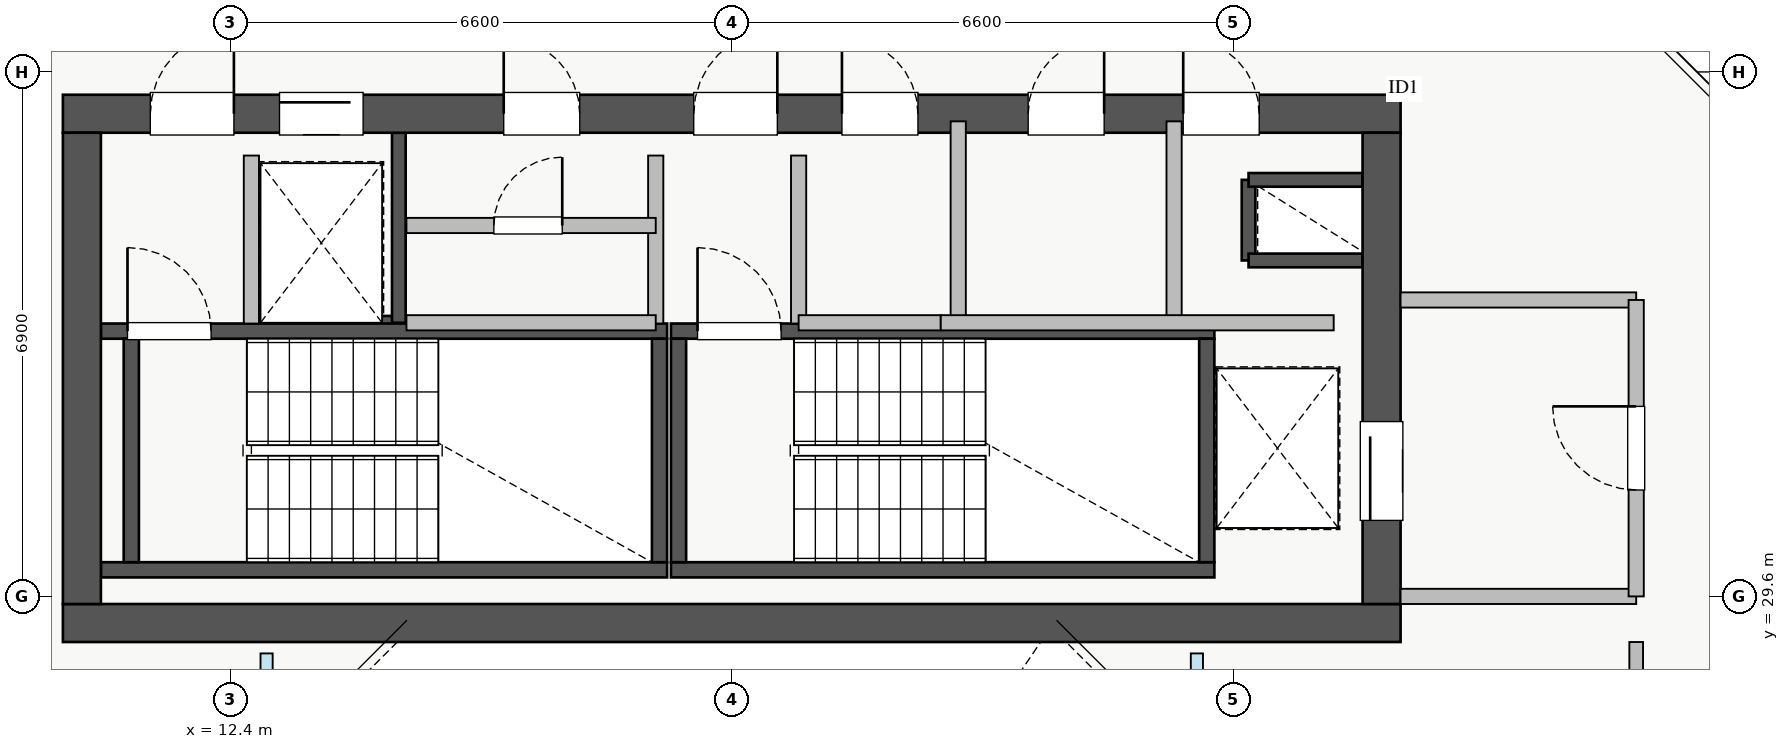
"""IFC4 building model, lengths in metres.
Left out: names, types, materials, properties, quantities, classifications, styles, units other than length and angle.
Written with IfcOpenShell. Run it as: python <this file> out.ifc"""

import sys

from ifc_helpers import new_model, si_unit, direction, frame, frame_2d, origin, place, context, subcontext, project, spatial, rectangle, extrude, source, transform, mapped, element, fill, save


model = new_model("IFC4")
c1 = context("Model", 3, precision=1e-05, world=origin(), true_north=direction((0.0, 1.0)))
c2 = subcontext(c1, "Body", "Model", "MODEL_VIEW")
j1 = project(units=[si_unit("LENGTHUNIT", "METRE"), si_unit("PLANEANGLEUNIT", "RADIAN")], contexts=[c1])
p1 = place(None, origin())
s1 = spatial("IfcSite", under=j1, at=p1, CompositionType="ELEMENT")
p2 = place(p1, origin())
s2 = spatial("IfcBuilding", under=s1, at=p2, CompositionType="ELEMENT")
p3 = place(p2, frame((0.0, 0.0, 219.75)))
s3 = spatial("IfcBuildingStorey", under=s2, at=p3, CompositionType="ELEMENT", Elevation=219.75)
p4 = place(p3, frame((12.68, 33.2, 0.0), z_axis=(0.0, 0.0, 1.0), x_axis=(1.0, 0.0, 0.0)))
e1 = element("IfcWall", 1, at=p4, inside=s3, PredefinedType="SHEAR", context=c2, shape_type="SweptSolid", body=[
    extrude(rectangle(XDim=1.94, YDim=0.18, at=frame_2d((0.97, 0.0))), origin(), (0.0, 0.0, 1.0), 3.07),
])
p5 = place(p3, frame((14.62, 33.2, 0.0), z_axis=(0.0, 0.0, 1.0), x_axis=(0.0, 1.0, 0.0)))
e2 = element("IfcWall", 2, at=p5, inside=s3, PredefinedType="SHEAR", context=c2, shape_type="SweptSolid", body=[
    extrude(rectangle(XDim=2.5, YDim=0.18, at=frame_2d((1.25, 0.0))), origin(), (0.0, 0.0, 1.0), 3.07),
])
p6 = place(p3, frame((25.8, 34.02, 0.0), z_axis=(0.0, 0.0, 1.0), x_axis=(0.0, 1.0, 0.0)))
e3 = element("IfcWall", 3, at=p6, inside=s3, PredefinedType="SHEAR", context=c2, shape_type="SweptSolid", body=[
    extrude(rectangle(XDim=1.06, YDim=0.18, at=frame_2d((0.53, 0.0))), origin(), (0.0, 0.0, 1.0), 3.07),
])
for number, where, z_axis, x_axis in (
    (4, (25.8, 35.08, 0.0), (0.0, 0.0, 1.0), (1.0, 0.0, 0.0)),
    (5, (25.8, 34.02, 0.0), (0.0, 0.0, 1.0), (1.0, 0.0, 0.0)),
):
    element("IfcWall", number, at=place(p3, frame(where, z_axis=z_axis, x_axis=x_axis)), inside=s3, PredefinedType="SHEAR", context=c2, shape_type="SweptSolid", body=[
        extrude(rectangle(XDim=1.5, YDim=0.18, at=frame_2d((0.75, 0.0))), origin(), (0.0, 0.0, 1.0), 3.07),
    ])
p7 = place(p3, frame((10.7, 29.95, 0.0), z_axis=(0.0, 0.0, 1.0), x_axis=(1.0, 0.0, 0.0)))
e6 = element("IfcWall", 6, at=p7, inside=s3, PredefinedType="SHEAR", context=c2, shape_type="SweptSolid", body=[
    extrude(rectangle(XDim=7.45, YDim=0.2, at=frame_2d((3.725, 0.0))), origin(), (0.0, 0.0, 1.0), 3.25),
])
p8 = place(p3, frame((10.7, 33.09, 0.0), z_axis=(0.0, 0.0, 1.0), x_axis=(1.0, 0.0, 0.0)))
e7 = element("IfcWall", 7, at=p8, inside=s3, PredefinedType="SHEAR", context=c2, shape_type="SweptSolid", body=[
    extrude(rectangle(XDim=7.45, YDim=0.2, at=frame_2d((3.725, 0.0))), origin(), (0.0, 0.0, 1.0), 3.25),
])
p9 = place(p8, frame((0.35, 0.0, 0.0)))
e8 = element("IfcOpeningElement", 8, at=p9, cuts=e7, PredefinedType="OPENING", context=c2, shape_type="SweptSolid", body=[
    extrude(rectangle(XDim=1.1, YDim=2.05, at=frame_2d((0.55, 1.025))), frame((0.0, 0.11, 0.0), z_axis=(0.0, -1.0, 0.0), x_axis=(1.0, 0.0, 0.0)), (0.0, 0.0, 1.0), 0.22),
])
for number, where, z_axis, x_axis in (
    (9, (11.1, 30.05, 0.0), (0.0, 0.0, 1.0), (0.0, 1.0, 0.0)),
    (10, (18.05, 30.05, 0.0), (0.0, 0.0, 1.0), (0.0, 1.0, 0.0)),
):
    element("IfcWall", number, at=place(p3, frame(where, z_axis=z_axis, x_axis=x_axis)), inside=s3, PredefinedType="SHEAR", context=c2, shape_type="SweptSolid", body=[
        extrude(rectangle(XDim=2.94, YDim=0.2, at=frame_2d((1.47, 0.0))), origin(), (0.0, 0.0, 1.0), 3.25),
    ])
p10 = place(p3, frame((18.2, 29.95, 0.0), z_axis=(0.0, 0.0, 1.0), x_axis=(1.0, 0.0, 0.0)))
e11 = element("IfcWall", 11, at=p10, inside=s3, PredefinedType="SHEAR", context=c2, shape_type="SweptSolid", body=[
    extrude(rectangle(XDim=7.15, YDim=0.2, at=frame_2d((3.575, 0.0))), origin(), (0.0, 0.0, 1.0), 3.25),
])
p11 = place(p3, frame((18.2, 33.09, 0.0), z_axis=(0.0, 0.0, 1.0), x_axis=(1.0, 0.0, 0.0)))
e12 = element("IfcWall", 12, at=p11, inside=s3, PredefinedType="SHEAR", context=c2, shape_type="SweptSolid", body=[
    extrude(rectangle(XDim=7.15, YDim=0.2, at=frame_2d((3.575, 0.0))), origin(), (0.0, 0.0, 1.0), 3.25),
])
p12 = place(p11, frame((0.35, 0.0, 0.0)))
e13 = element("IfcOpeningElement", 13, at=p12, cuts=e12, PredefinedType="OPENING", context=c2, shape_type="SweptSolid", body=[
    extrude(rectangle(XDim=1.1, YDim=2.05, at=frame_2d((0.55, 1.025))), frame((0.0, 0.11, 0.0), z_axis=(0.0, -1.0, 0.0), x_axis=(1.0, 0.0, 0.0)), (0.0, 0.0, 1.0), 0.22),
])
for number, where, z_axis, x_axis in (
    (14, (18.3, 30.05, 0.0), (0.0, 0.0, 1.0), (0.0, 1.0, 0.0)),
    (15, (25.25, 30.05, 0.0), (0.0, 0.0, 1.0), (0.0, 1.0, 0.0)),
):
    element("IfcWall", number, at=place(p3, frame(where, z_axis=z_axis, x_axis=x_axis)), inside=s3, PredefinedType="SHEAR", context=c2, shape_type="SweptSolid", body=[
        extrude(rectangle(XDim=2.94, YDim=0.2, at=frame_2d((1.47, 0.0))), origin(), (0.0, 0.0, 1.0), 3.25),
    ])
p13 = place(p3, frame((10.2, 29.25, 0.0), z_axis=(0.0, 0.0, 1.0), x_axis=(1.0, 0.0, 0.0)))
e16 = element("IfcWall", 16, at=p13, inside=s3, PredefinedType="SHEAR", context=c2, shape_type="SweptSolid", body=[
    extrude(rectangle(XDim=17.6, YDim=0.5, at=frame_2d((8.8, 0.0))), origin(), (0.0, 0.0, 1.0), 3.25),
])
p14 = place(p3, frame((10.2, 35.95, 0.0), z_axis=(0.0, 0.0, 1.0), x_axis=(1.0, 0.0, 0.0)))
e17 = element("IfcWall", 17, at=p14, inside=s3, PredefinedType="SHEAR", context=c2, shape_type="SweptSolid", body=[
    extrude(rectangle(XDim=17.6, YDim=0.5, at=frame_2d((8.8, 0.0))), origin(), (0.0, 0.0, 1.0), 3.25),
])
p15 = place(p14, frame((1.15, 0.0, 0.0)))
e18 = element("IfcOpeningElement", 18, at=p15, cuts=e17, PredefinedType="OPENING", context=c2, shape_type="SweptSolid", body=[
    extrude(rectangle(XDim=1.1, YDim=2.05, at=frame_2d((0.55, 1.025))), frame((0.0, 0.26, 0.0), z_axis=(0.0, -1.0, 0.0), x_axis=(1.0, 0.0, 0.0)), (0.0, 0.0, 1.0), 0.52),
])
p16 = place(p14, frame((8.3, 0.0, 0.0)))
e19 = element("IfcOpeningElement", 19, at=p16, cuts=e17, PredefinedType="OPENING", context=c2, shape_type="SweptSolid", body=[
    extrude(rectangle(XDim=1.1, YDim=2.05, at=frame_2d((0.55, 1.025))), frame((0.0, 0.26, 0.0), z_axis=(0.0, -1.0, 0.0), x_axis=(1.0, 0.0, 0.0)), (0.0, 0.0, 1.0), 0.52),
])
p17 = place(p14, frame((2.85, 0.0, 0.0)))
e20 = element("IfcOpeningElement", 20, at=p17, cuts=e17, PredefinedType="OPENING", context=c2, shape_type="SweptSolid", body=[
    extrude(rectangle(XDim=1.1, YDim=2.05, at=frame_2d((0.55, 1.025))), frame((0.0, 0.26, 0.0), z_axis=(0.0, -1.0, 0.0), x_axis=(1.0, 0.0, 0.0)), (0.0, 0.0, 1.0), 0.52),
])
p18 = place(p14, frame((5.8, 0.0, 0.0)))
e21 = element("IfcOpeningElement", 21, at=p18, cuts=e17, PredefinedType="OPENING", context=c2, shape_type="SweptSolid", body=[
    extrude(rectangle(XDim=1.0, YDim=2.05, at=frame_2d((0.5, 1.025))), frame((0.0, 0.26, 0.0), z_axis=(0.0, -1.0, 0.0), x_axis=(1.0, 0.0, 0.0)), (0.0, 0.0, 1.0), 0.52),
])
p19 = place(p14, frame((14.74, 0.0, 0.0)))
e22 = element("IfcOpeningElement", 22, at=p19, cuts=e17, PredefinedType="OPENING", context=c2, shape_type="SweptSolid", body=[
    extrude(rectangle(XDim=1.0, YDim=2.05, at=frame_2d((0.5, 1.025))), frame((0.0, 0.26, 0.0), z_axis=(0.0, -1.0, 0.0), x_axis=(1.0, 0.0, 0.0)), (0.0, 0.0, 1.0), 0.52),
])
p20 = place(p14, frame((10.25, 0.0, 0.0)))
e23 = element("IfcOpeningElement", 23, at=p20, cuts=e17, PredefinedType="OPENING", context=c2, shape_type="SweptSolid", body=[
    extrude(rectangle(XDim=1.0, YDim=2.05, at=frame_2d((0.5, 1.025))), frame((0.0, 0.26, 0.0), z_axis=(0.0, -1.0, 0.0), x_axis=(1.0, 0.0, 0.0)), (0.0, 0.0, 1.0), 0.52),
])
p21 = place(p14, frame((12.7, 0.0, 0.0)))
e24 = element("IfcOpeningElement", 24, at=p21, cuts=e17, PredefinedType="OPENING", context=c2, shape_type="SweptSolid", body=[
    extrude(rectangle(XDim=1.0, YDim=2.05, at=frame_2d((0.5, 1.025))), frame((0.0, 0.26, 0.0), z_axis=(0.0, -1.0, 0.0), x_axis=(1.0, 0.0, 0.0)), (0.0, 0.0, 1.0), 0.52),
])
p22 = place(p3, frame((10.45, 29.5, 0.0), z_axis=(0.0, 0.0, 1.0), x_axis=(0.0, 1.0, 0.0)))
e25 = element("IfcWall", 25, at=p22, inside=s3, PredefinedType="SHEAR", context=c2, shape_type="SweptSolid", body=[
    extrude(rectangle(XDim=6.2, YDim=0.5, at=frame_2d((3.1, 0.0))), origin(), (0.0, 0.0, 1.0), 3.25),
])
p23 = place(p3, frame((27.55, 29.5, 0.0), z_axis=(0.0, 0.0, 1.0), x_axis=(0.0, 1.0, 0.0)))
e26 = element("IfcWall", 26, at=p23, inside=s3, PredefinedType="SHEAR", context=c2, shape_type="SweptSolid", body=[
    extrude(rectangle(XDim=6.2, YDim=0.5, at=frame_2d((3.1, 0.0))), origin(), (0.0, 0.0, 1.0), 3.25),
])
p24 = place(p23, frame((1.1, 0.0, 0.0)))
e27 = element("IfcOpeningElement", 27, at=p24, cuts=e26, PredefinedType="OPENING", context=c2, shape_type="SweptSolid", body=[
    extrude(rectangle(XDim=1.3, YDim=2.05, at=frame_2d((0.65, 1.025))), frame((0.0, 0.26, 0.0), z_axis=(0.0, -1.0, 0.0), x_axis=(1.0, 0.0, 0.0)), (0.0, 0.0, 1.0), 0.52),
])
p25 = place(p3, frame((27.8, 29.6, 0.0), z_axis=(0.0, 0.0, 1.0), x_axis=(1.0, 0.0, 0.0)))
e28 = element("IfcWall", 28, at=p25, inside=s3, PredefinedType="PARTITIONING", context=c2, shape_type="SweptSolid", body=[
    extrude(rectangle(XDim=3.1, YDim=0.2, at=frame_2d((1.55, 0.0))), origin(), (0.0, 0.0, 1.0), 3.07),
])
p26 = place(p3, frame((27.8, 33.5, 0.0), z_axis=(0.0, 0.0, 1.0), x_axis=(1.0, 0.0, 0.0)))
e29 = element("IfcWall", 29, at=p26, inside=s3, PredefinedType="PARTITIONING", context=c2, shape_type="SweptSolid", body=[
    extrude(rectangle(XDim=3.1, YDim=0.2, at=frame_2d((1.55, 0.0))), origin(), (0.0, 0.0, 1.0), 2.265),
])
p27 = place(p3, frame((30.9, 29.6, 0.0), z_axis=(0.0, 0.0, 1.0), x_axis=(0.0, 1.0, 0.0)))
e30 = element("IfcWall", 30, at=p27, inside=s3, PredefinedType="PARTITIONING", context=c2, shape_type="SweptSolid", body=[
    extrude(rectangle(XDim=3.9, YDim=0.2, at=frame_2d((1.95, 0.0))), origin(), (0.0, 0.0, 1.0), 3.07),
])
p28 = place(p27, frame((1.4, 0.0, 0.0)))
e31 = element("IfcOpeningElement", 31, at=p28, cuts=e30, PredefinedType="OPENING", context=c2, shape_type="SweptSolid", body=[
    extrude(rectangle(XDim=1.1, YDim=2.05, at=frame_2d((0.55, 1.025))), frame((0.0, 0.11, 0.0), z_axis=(0.0, -1.0, 0.0), x_axis=(1.0, 0.0, 0.0)), (0.0, 0.0, 1.0), 0.22),
])
for number, where, z_axis, x_axis in (
    (32, (12.68, 33.19, 0.0), (0.0, 0.0, 1.0), (0.0, 1.0, 0.0)),
    (33, (18.0, 33.19, 0.0), (0.0, 0.0, 1.0), (0.0, 1.0, 0.0)),
    (34, (19.88, 33.19, 0.0), (0.0, 0.0, 1.0), (0.0, 1.0, 0.0)),
):
    element("IfcWall", number, at=place(p3, frame(where, z_axis=z_axis, x_axis=x_axis)), inside=s3, PredefinedType="PARTITIONING", context=c2, shape_type="SweptSolid", body=[
        extrude(rectangle(XDim=2.21, YDim=0.2, at=frame_2d((1.105, 0.0))), origin(), (0.0, 0.0, 1.0), 3.07),
    ])
p29 = place(p3, frame((14.72, 34.48, 0.0), z_axis=(0.0, 0.0, 1.0), x_axis=(1.0, 0.0, 0.0)))
e35 = element("IfcWall", 35, at=p29, inside=s3, PredefinedType="PARTITIONING", context=c2, shape_type="SweptSolid", body=[
    extrude(rectangle(XDim=3.28, YDim=0.2, at=frame_2d((1.64, 0.0))), origin(), (0.0, 0.0, 1.0), 3.07),
])
p30 = place(p29, frame((1.15, 0.0, 0.0)))
e36 = element("IfcOpeningElement", 36, at=p30, cuts=e35, PredefinedType="OPENING", context=c2, shape_type="SweptSolid", body=[
    extrude(rectangle(XDim=0.9, YDim=2.05, at=frame_2d((0.45, 1.025))), frame((0.0, 0.11, 0.0), z_axis=(0.0, -1.0, 0.0), x_axis=(1.0, 0.0, 0.0)), (0.0, 0.0, 1.0), 0.22),
])
p31 = place(p3, frame((14.72, 33.2, 0.0), z_axis=(0.0, 0.0, 1.0), x_axis=(1.0, 0.0, 0.0)))
e37 = element("IfcWall", 37, at=p31, inside=s3, PredefinedType="PARTITIONING", context=c2, shape_type="SweptSolid", body=[
    extrude(rectangle(XDim=3.28, YDim=0.2, at=frame_2d((1.64, 0.0))), origin(), (0.0, 0.0, 1.0), 3.07),
])
p32 = place(p3, frame((24.82, 33.2, 0.0), z_axis=(0.0, 0.0, 1.0), x_axis=(0.0, 1.0, 0.0)))
e38 = element("IfcWall", 38, at=p32, inside=s3, PredefinedType="PARTITIONING", context=c2, shape_type="SweptSolid", body=[
    extrude(rectangle(XDim=2.65, YDim=0.2, at=frame_2d((1.325, 0.0))), origin(), (0.0, 0.0, 1.0), 3.07),
])
p33 = place(p3, frame((19.88, 33.2, 0.0), z_axis=(0.0, 0.0, 1.0), x_axis=(1.0, 0.0, 0.0)))
e39 = element("IfcWall", 39, at=p33, inside=s3, PredefinedType="PARTITIONING", context=c2, shape_type="SweptSolid", body=[
    extrude(rectangle(XDim=1.87, YDim=0.2, at=frame_2d((0.935, 0.0))), origin(), (0.0, 0.0, 1.0), 3.07),
])
p34 = place(p3, frame((21.98, 33.2, 0.0), z_axis=(0.0, 0.0, 1.0), x_axis=(0.0, 1.0, 0.0)))
e40 = element("IfcWall", 40, at=p34, inside=s3, PredefinedType="PARTITIONING", context=c2, shape_type="SweptSolid", body=[
    extrude(rectangle(XDim=2.65, YDim=0.2, at=frame_2d((1.325, 0.0))), origin(), (0.0, 0.0, 1.0), 3.07),
])
p35 = place(p3, frame((21.75, 33.2, 0.0), z_axis=(0.0, 0.0, 1.0), x_axis=(1.0, 0.0, 0.0)))
e41 = element("IfcWall", 41, at=p35, inside=s3, PredefinedType="PARTITIONING", context=c2, shape_type="SweptSolid", body=[
    extrude(rectangle(XDim=5.17, YDim=0.2, at=frame_2d((2.585, 0.0))), origin(), (0.0, 0.0, 1.0), 3.07),
])
p36 = place(p3, frame((30.9, 17.0, 0.0), z_axis=(0.0, 0.0, 1.0), x_axis=(0.0, 1.0, 0.0)))
e42 = element("IfcWall", 42, at=p36, inside=s3, PredefinedType="PARTITIONING", context=c2, shape_type="SweptSolid", body=[
    extrude(rectangle(XDim=12.0, YDim=0.18, at=frame_2d((6.0, 0.0))), origin(), (0.0, 0.0, 1.0), 3.07),
])
p37 = place(p36, frame((1.5, 0.0, 0.0)))
e43 = element("IfcOpeningElement", 43, at=p37, cuts=e42, PredefinedType="OPENING", context=c2, shape_type="SweptSolid", body=[
    extrude(rectangle(XDim=1.0, YDim=2.05, at=frame_2d((0.5, 1.025))), frame((0.0, 0.1, 0.0), z_axis=(0.0, -1.0, 0.0), x_axis=(1.0, 0.0, 0.0)), (0.0, 0.0, 1.0), 0.2),
])
p38 = place(p36, frame((5.5, 0.0, 0.0)))
e44 = element("IfcOpeningElement", 44, at=p38, cuts=e42, PredefinedType="OPENING", context=c2, shape_type="SweptSolid", body=[
    extrude(rectangle(XDim=1.0, YDim=2.05, at=frame_2d((0.5, 1.025))), frame((0.0, 0.1, 0.0), z_axis=(0.0, -1.0, 0.0), x_axis=(1.0, 0.0, 0.0)), (0.0, 0.0, 1.0), 0.2),
])
p39 = place(p36, frame((9.5, 0.0, 0.0)))
e45 = element("IfcOpeningElement", 45, at=p39, cuts=e42, PredefinedType="OPENING", context=c2, shape_type="SweptSolid", body=[
    extrude(rectangle(XDim=1.0, YDim=2.05, at=frame_2d((0.5, 1.025))), frame((0.0, 0.1, 0.0), z_axis=(0.0, -1.0, 0.0), x_axis=(1.0, 0.0, 0.0)), (0.0, 0.0, 1.0), 0.2),
])
m1 = source(origin(), c2, "Body", "SweptSolid", [
    extrude(rectangle(XDim=1.3, YDim=2.05, at=frame_2d((0.65, 1.025))), frame((0.0, 0.025, 0.0), z_axis=(0.0, -1.0, 0.0), x_axis=(1.0, 0.0, 0.0)), (0.0, 0.0, 1.0), 0.05),
])
p40 = place(p24, origin())
e46 = element("IfcDoor", 46, at=p40, inside=s3, OperationType="SLIDING_TO_LEFT", PredefinedType="DOOR", context=c2, shape_type="MappedRepresentation", body=[
    mapped(m1, transform((0.0, 0.0, 0.0), x_axis=(1.0, 0.0, 0.0), y_axis=(0.0, 1.0, 0.0), z_axis=(0.0, 0.0, 1.0), scale=1.0)),
])
fill(e27, e46)
m2 = source(origin(), c2, "Body", "SweptSolid", [
    extrude(rectangle(XDim=1.1, YDim=2.05, at=frame_2d((0.55, 1.025))), frame((0.0, 0.025, 0.0), z_axis=(0.0, -1.0, 0.0), x_axis=(1.0, 0.0, 0.0)), (0.0, 0.0, 1.0), 0.05),
])
p41 = place(p15, origin())
e47 = element("IfcDoor", 47, at=p41, inside=s3, OperationType="SINGLE_SWING_RIGHT", PredefinedType="DOOR", context=c2, shape_type="MappedRepresentation", body=[
    mapped(m2, transform((0.0, 0.0, 0.0), x_axis=(1.0, 0.0, 0.0), y_axis=(0.0, 1.0, 0.0), z_axis=(0.0, 0.0, 1.0), scale=1.0)),
])
fill(e18, e47)
p42 = place(p9, origin())
e48 = element("IfcDoor", 48, at=p42, inside=s3, OperationType="SINGLE_SWING_LEFT", PredefinedType="DOOR", context=c2, shape_type="MappedRepresentation", body=[
    mapped(m2, transform((0.0, 0.0, 0.0), x_axis=(1.0, 0.0, 0.0), y_axis=(0.0, 1.0, 0.0), z_axis=(0.0, 0.0, 1.0), scale=1.0)),
])
fill(e8, e48)
p43 = place(p16, origin())
e49 = element("IfcDoor", 49, at=p43, inside=s3, OperationType="SINGLE_SWING_RIGHT", PredefinedType="DOOR", context=c2, shape_type="MappedRepresentation", body=[
    mapped(m2, transform((0.0, 0.0, 0.0), x_axis=(1.0, 0.0, 0.0), y_axis=(0.0, 1.0, 0.0), z_axis=(0.0, 0.0, 1.0), scale=1.0)),
])
fill(e19, e49)
p44 = place(p12, origin())
e50 = element("IfcDoor", 50, at=p44, inside=s3, OperationType="SINGLE_SWING_LEFT", PredefinedType="DOOR", context=c2, shape_type="MappedRepresentation", body=[
    mapped(m2, transform((0.0, 0.0, 0.0), x_axis=(1.0, 0.0, 0.0), y_axis=(0.0, 1.0, 0.0), z_axis=(0.0, 0.0, 1.0), scale=1.0)),
])
fill(e13, e50)
p45 = place(p17, origin())
e51 = element("IfcDoor", 51, at=p45, inside=s3, OperationType="SLIDING_TO_LEFT", PredefinedType="DOOR", context=c2, shape_type="MappedRepresentation", body=[
    mapped(m2, transform((0.0, 0.0, 0.0), x_axis=(1.0, 0.0, 0.0), y_axis=(0.0, 1.0, 0.0), z_axis=(0.0, 0.0, 1.0), scale=1.0)),
])
fill(e20, e51)
m3 = source(origin(), c2, "Body", "SweptSolid", [
    extrude(rectangle(XDim=1.0, YDim=2.05, at=frame_2d((0.5, 1.025))), frame((0.0, 0.025, 0.0), z_axis=(0.0, -1.0, 0.0), x_axis=(1.0, 0.0, 0.0)), (0.0, 0.0, 1.0), 0.05),
])
p46 = place(p18, origin())
e52 = element("IfcDoor", 52, at=p46, inside=s3, OperationType="SINGLE_SWING_LEFT", PredefinedType="DOOR", context=c2, shape_type="MappedRepresentation", body=[
    mapped(m3, transform((0.0, 0.0, 0.0), x_axis=(1.0, 0.0, 0.0), y_axis=(0.0, 1.0, 0.0), z_axis=(0.0, 0.0, 1.0), scale=1.0)),
])
fill(e21, e52)
p47 = place(p19, origin())
e53 = element("IfcDoor", 53, at=p47, inside=s3, OperationType="SINGLE_SWING_LEFT", PredefinedType="DOOR", context=c2, shape_type="MappedRepresentation", body=[
    mapped(m3, transform((0.0, 0.0, 0.0), x_axis=(1.0, 0.0, 0.0), y_axis=(0.0, 1.0, 0.0), z_axis=(0.0, 0.0, 1.0), scale=1.0)),
])
fill(e22, e53)
p48 = place(p20, origin())
e54 = element("IfcDoor", 54, at=p48, inside=s3, OperationType="SINGLE_SWING_LEFT", PredefinedType="DOOR", context=c2, shape_type="MappedRepresentation", body=[
    mapped(m3, transform((0.0, 0.0, 0.0), x_axis=(1.0, 0.0, 0.0), y_axis=(0.0, 1.0, 0.0), z_axis=(0.0, 0.0, 1.0), scale=1.0)),
])
fill(e23, e54)
p49 = place(p21, origin())
e55 = element("IfcDoor", 55, at=p49, inside=s3, OperationType="SINGLE_SWING_RIGHT", PredefinedType="DOOR", context=c2, shape_type="MappedRepresentation", body=[
    mapped(m3, transform((0.0, 0.0, 0.0), x_axis=(1.0, 0.0, 0.0), y_axis=(0.0, 1.0, 0.0), z_axis=(0.0, 0.0, 1.0), scale=1.0)),
])
fill(e24, e55)
p50 = place(p28, origin())
e56 = element("IfcDoor", 56, at=p50, inside=s3, OperationType="SINGLE_SWING_RIGHT", PredefinedType="DOOR", context=c2, shape_type="MappedRepresentation", body=[
    mapped(m2, transform((0.0, 0.0, 0.0), x_axis=(1.0, 0.0, 0.0), y_axis=(0.0, 1.0, 0.0), z_axis=(0.0, 0.0, 1.0), scale=1.0)),
])
fill(e31, e56)
m4 = source(origin(), c2, "Body", "SweptSolid", [
    extrude(rectangle(XDim=0.9, YDim=2.05, at=frame_2d((0.45, 1.025))), frame((0.0, 0.025, 0.0), z_axis=(0.0, -1.0, 0.0), x_axis=(1.0, 0.0, 0.0)), (0.0, 0.0, 1.0), 0.05),
])
p51 = place(p30, origin())
e57 = element("IfcDoor", 57, at=p51, inside=s3, OperationType="SINGLE_SWING_RIGHT", PredefinedType="DOOR", context=c2, shape_type="MappedRepresentation", body=[
    mapped(m4, transform((0.0, 0.0, 0.0), x_axis=(1.0, 0.0, 0.0), y_axis=(0.0, 1.0, 0.0), z_axis=(0.0, 0.0, 1.0), scale=1.0)),
])
fill(e36, e57)
save(model, sys.argv[1])
